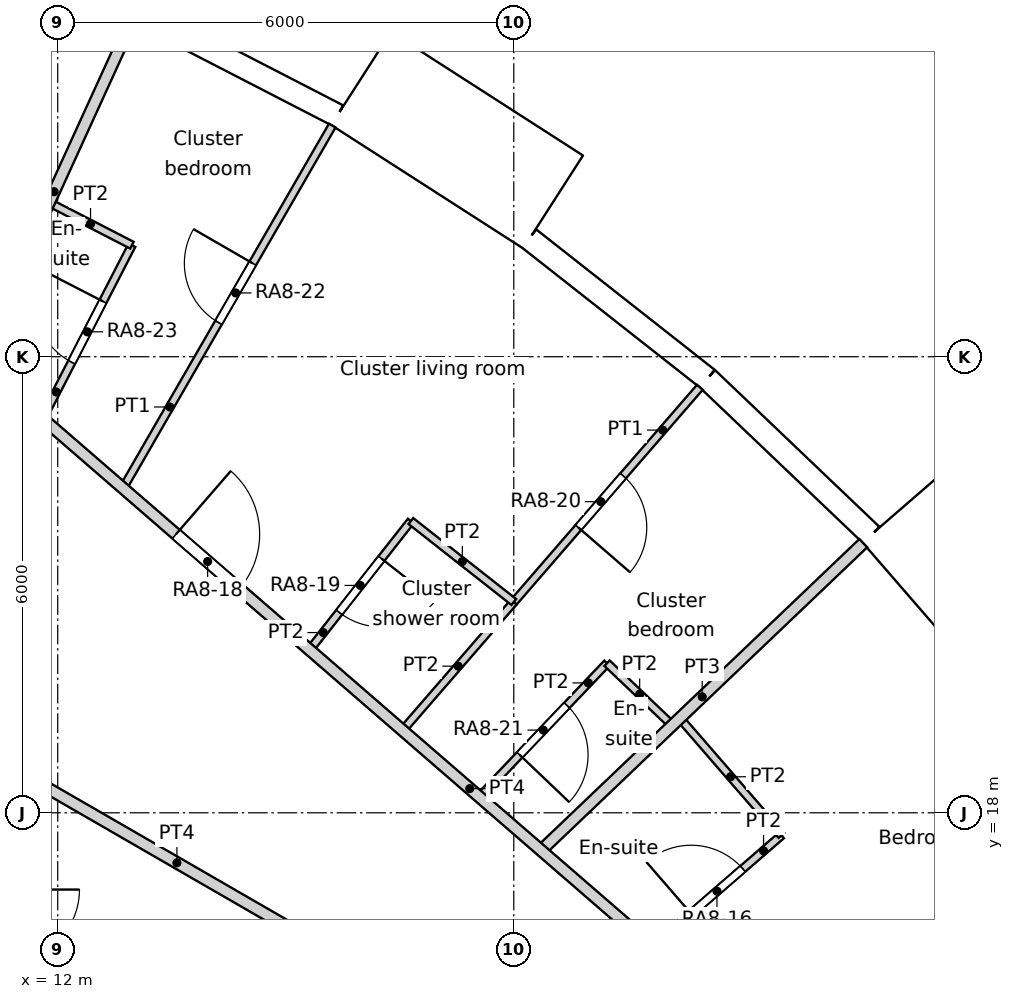
"""IFC4 building model, lengths in metres.
Left out: names, types, materials, properties, quantities, classifications, styles, units other than length and angle.
Written with IfcOpenShell. Run it as: python <this file> out.ifc"""

import sys

from ifc_helpers import new_model, si_unit, direction, frame, frame_2d, origin, origin_2d, place, context, subcontext, project, spatial, rectangle, circle, extrude, element, fill, save


model = new_model("IFC4")
c1 = context("Model", 3, precision=1e-05, world=origin(), true_north=direction((0.0, 1.0)))
c2 = subcontext(c1, "Body", "Model", "MODEL_VIEW")
j1 = project(units=[si_unit("LENGTHUNIT", "METRE"), si_unit("PLANEANGLEUNIT", "RADIAN")], contexts=[c1])
p1 = place(None, origin())
s1 = spatial("IfcSite", under=j1, at=p1, CompositionType="ELEMENT")
p2 = place(p1, origin())
s2 = spatial("IfcBuilding", under=s1, at=p2, CompositionType="ELEMENT")
p3 = place(p2, frame((0.0, 0.0, 103.8)))
s3 = spatial("IfcBuildingStorey", under=s2, at=p3, CompositionType="ELEMENT", Elevation=103.8)
for number, where, z_axis, x_axis in (
    (1, (21.911, 20.892, 0.0), (0.0, 0.0, 1.0), (1.0, 0.0, 0.0)),
    (2, (17.561, 24.661, 0.0), (0.0, 0.0, 1.0), (1.0, 0.0, 0.0)),
    (3, (12.576, 27.539, 0.0), (0.0, 0.0, 1.0), (1.0, 0.0, 0.0)),
):
    element("IfcColumn", number, at=place(p3, frame(where, z_axis=z_axis, x_axis=x_axis)), inside=s3, PredefinedType="COLUMN", context=c2, shape_type="SweptSolid", body=[
        extrude(circle(Radius=0.6, at=origin_2d()), origin(), (0.0, 0.0, 1.0), 3.6),
    ])
p4 = place(p3, frame((14.659, 19.69, 0.0), z_axis=(0.0, 0.0, 1.0), x_axis=(1.0, 0.0, 0.0)))
e4 = element("IfcColumn", 4, at=p4, inside=s3, PredefinedType="COLUMN", context=c2, shape_type="SweptSolid", body=[
    extrude(circle(Radius=0.65, at=origin_2d()), origin(), (0.0, 0.0, 1.0), 3.6),
])
p5 = place(p3, frame((25.101, 19.766, -0.45), z_axis=(0.0, 0.0, 1.0), x_axis=(-0.654890259022, 0.75572398972, 0.0)))
e5 = element("IfcWall", 5, at=p5, inside=s3, PredefinedType="ELEMENTEDWALL", context=c2, shape_type="SweptSolid", body=[
    extrude(rectangle(XDim=3.0, YDim=1.45, at=frame_2d((1.5, 0.0))), origin(), (0.0, 0.0, 1.0), 3.6),
])
p6 = place(p5, frame((1.5, 0.0, 2.0)))
e6 = element("IfcOpeningElement", 6, at=p6, cuts=e5, PredefinedType="OPENING", context=c2, shape_type="SweptSolid", body=[
    extrude(circle(Radius=0.9, at=origin_2d()), frame((0.0, 0.735, 0.0), z_axis=(0.0, -1.0, 0.0), x_axis=(1.0, 0.0, 0.0)), (0.0, 0.0, 1.0), 1.47),
])
p7 = place(p3, frame((22.702, 21.655, 0.0), z_axis=(0.0, 0.0, 1.0), x_axis=(-0.723744206617, 0.690068346896, 0.0)))
e7 = element("IfcWall", 7, at=p7, inside=s3, PredefinedType="SOLIDWALL", context=c2, shape_type="SweptSolid", body=[
    extrude(rectangle(XDim=2.98, YDim=0.3, at=frame_2d((1.49, 0.0))), origin(), (0.0, 0.0, 1.0), 3.15),
])
p8 = place(p7, frame((1.49, 0.0, 1.55)))
e8 = element("IfcOpeningElement", 8, at=p8, cuts=e7, PredefinedType="OPENING", context=c2, shape_type="SweptSolid", body=[
    extrude(circle(Radius=0.9, at=origin_2d()), frame((0.0, 0.16, 0.0), z_axis=(0.0, -1.0, 0.0), x_axis=(1.0, 0.0, 0.0)), (0.0, 0.0, 1.0), 0.32),
])
p9 = place(p3, frame((20.546, 23.711, 0.0), z_axis=(0.0, 0.0, 1.0), x_axis=(-0.786045331304, 0.618168858108, 0.0)))
e9 = element("IfcWall", 9, at=p9, inside=s3, PredefinedType="SOLIDWALL", context=c2, shape_type="SweptSolid", body=[
    extrude(rectangle(XDim=2.98, YDim=0.3, at=frame_2d((1.49, 0.0))), origin(), (0.0, 0.0, 1.0), 3.15),
])
p10 = place(p9, frame((1.49, 0.0, 1.55)))
e10 = element("IfcOpeningElement", 10, at=p10, cuts=e9, PredefinedType="OPENING", context=c2, shape_type="SweptSolid", body=[
    extrude(circle(Radius=0.9, at=origin_2d()), frame((0.0, 0.16, 0.0), z_axis=(0.0, -1.0, 0.0), x_axis=(1.0, 0.0, 0.0)), (0.0, 0.0, 1.0), 0.32),
])
p11 = place(p3, frame((18.516, 26.037, -0.45), z_axis=(0.0, 0.0, 1.0), x_axis=(-0.841223422347, 0.540687667415, 0.0)))
e11 = element("IfcWall", 11, at=p11, inside=s3, PredefinedType="ELEMENTEDWALL", context=c2, shape_type="SweptSolid", body=[
    extrude(rectangle(XDim=3.0, YDim=1.45, at=frame_2d((1.5, 0.0))), origin(), (0.0, 0.0, 1.0), 3.6),
])
p12 = place(p11, frame((1.5, 0.0, 2.0)))
e12 = element("IfcOpeningElement", 12, at=p12, cuts=e11, PredefinedType="OPENING", context=c2, shape_type="SweptSolid", body=[
    extrude(circle(Radius=0.9, at=origin_2d()), frame((0.0, 0.735, 0.0), z_axis=(0.0, -1.0, 0.0), x_axis=(1.0, 0.0, 0.0)), (0.0, 0.0, 1.0), 1.47),
])
p13 = place(p3, frame((15.682, 27.174, 0.0), z_axis=(0.0, 0.0, 1.0), x_axis=(-0.888819853856, 0.458256770153, 0.0)))
e13 = element("IfcWall", 13, at=p13, inside=s3, PredefinedType="SOLIDWALL", context=c2, shape_type="SweptSolid", body=[
    extrude(rectangle(XDim=2.98, YDim=0.3, at=frame_2d((1.49, 0.0))), origin(), (0.0, 0.0, 1.0), 3.15),
])
p14 = place(p13, frame((1.49, 0.0, 1.55)))
e14 = element("IfcOpeningElement", 14, at=p14, cuts=e13, PredefinedType="OPENING", context=c2, shape_type="SweptSolid", body=[
    extrude(circle(Radius=0.9, at=origin_2d()), frame((0.0, 0.16, 0.0), z_axis=(0.0, -1.0, 0.0), x_axis=(1.0, 0.0, 0.0)), (0.0, 0.0, 1.0), 0.32),
])
p15 = place(p3, frame((10.932, 23.939, 0.0), z_axis=(0.0, 0.0, 1.0), x_axis=(0.755838982892, -0.654757536757, 0.0)))
e15 = element("IfcWall", 15, at=p15, inside=s3, PredefinedType="PARTITIONING", context=c2, shape_type="SweptSolid", body=[
    extrude(rectangle(XDim=14.83, YDim=0.15, at=frame_2d((7.415, 0.0))), origin(), (0.0, 0.0, 1.0), 3.15),
])
p16 = place(p15, frame((12.796, 0.0, 0.0)))
e16 = element("IfcOpeningElement", 16, at=p16, cuts=e15, PredefinedType="OPENING", context=c2, shape_type="SweptSolid", body=[
    extrude(rectangle(XDim=1.0, YDim=2.1, at=frame_2d((0.5, 1.05))), frame((0.0, 0.075, 0.0), z_axis=(0.0, -1.0, 0.0), x_axis=(1.0, 0.0, 0.0)), (0.0, 0.0, 1.0), 0.15),
])
p17 = place(p15, frame((3.472, 0.0, 0.0)))
e17 = element("IfcOpeningElement", 17, at=p17, cuts=e15, PredefinedType="OPENING", context=c2, shape_type="SweptSolid", body=[
    extrude(rectangle(XDim=1.1, YDim=2.1, at=frame_2d((0.55, 1.05))), frame((0.0, 0.075, 0.0), z_axis=(0.0, -1.0, 0.0), x_axis=(1.0, 0.0, 0.0)), (0.0, 0.0, 1.0), 0.15),
])
p18 = place(p3, frame((11.336, 18.63, 0.0), z_axis=(0.0, 0.0, 1.0), x_axis=(0.866063337164, -0.499934291702, 0.0)))
e18 = element("IfcWall", 18, at=p18, inside=s3, PredefinedType="PARTITIONING", context=c2, shape_type="SweptSolid", body=[
    extrude(rectangle(XDim=5.155, YDim=0.15, at=frame_2d((2.577, 0.0))), origin(), (0.0, 0.0, 1.0), 3.15),
])
p19 = place(p3, frame((22.141, 14.229, 0.0), z_axis=(0.0, 0.0, 1.0), x_axis=(0.841265781699, 0.540621757371, 0.0)))
e19 = element("IfcWall", 19, at=p19, inside=s3, PredefinedType="PARTITIONING", context=c2, shape_type="SweptSolid", body=[
    extrude(rectangle(XDim=4.906, YDim=0.15, at=frame_2d((2.453, 0.0))), origin(), (0.0, 0.0, 1.0), 3.15),
])
p20 = place(p3, frame((19.826, 16.234, 0.0), z_axis=(0.0, 0.0, 1.0), x_axis=(0.755703447798, 0.654913963042, 0.0)))
e20 = element("IfcWall", 20, at=p20, inside=s3, PredefinedType="PARTITIONING", context=c2, shape_type="SweptSolid", body=[
    extrude(rectangle(XDim=2.243, YDim=0.1, at=frame_2d((1.122, 0.0))), origin(), (0.0, 0.0, 1.0), 3.15),
])
p21 = place(p20, frame((0.671, 0.0, 0.0)))
e21 = element("IfcOpeningElement", 21, at=p21, cuts=e20, PredefinedType="OPENING", context=c2, shape_type="SweptSolid", body=[
    extrude(rectangle(XDim=0.9, YDim=2.04, at=frame_2d((0.45, 1.02))), frame((0.0, 0.05, 0.0), z_axis=(0.0, -1.0, 0.0), x_axis=(1.0, 0.0, 0.0)), (0.0, 0.0, 1.0), 0.1),
])
p22 = place(p3, frame((20.184, 19.245, 0.0), z_axis=(0.0, 0.0, 1.0), x_axis=(0.655017058368, -0.755614090159, 0.0)))
e22 = element("IfcWall", 22, at=p22, inside=s3, PredefinedType="PARTITIONING", context=c2, shape_type="SweptSolid", body=[
    extrude(rectangle(XDim=2.041, YDim=0.1, at=frame_2d((1.021, 0.0))), origin(), (0.0, 0.0, 1.0), 3.15),
])
p23 = place(p3, frame((18.36, 17.505, 0.0), z_axis=(0.0, 0.0, 1.0), x_axis=(0.723686703731, 0.690128650937, 0.0)))
e23 = element("IfcWall", 23, at=p23, inside=s3, PredefinedType="PARTITIONING", context=c2, shape_type="SweptSolid", body=[
    extrude(rectangle(XDim=5.856, YDim=0.15, at=frame_2d((2.928, 0.0))), origin(), (0.0, 0.0, 1.0), 3.15),
])
p24 = place(p3, frame((16.646, 21.838, 0.0), z_axis=(0.0, 0.0, 1.0), x_axis=(0.78601333061, -0.618209547082, 0.0)))
e24 = element("IfcWall", 24, at=p24, inside=s3, PredefinedType="PARTITIONING", context=c2, shape_type="SweptSolid", body=[
    extrude(rectangle(XDim=1.723, YDim=0.1, at=frame_2d((0.861, 0.0))), origin(), (0.0, 0.0, 1.0), 3.15),
])
p25 = place(p3, frame((15.315, 20.144, 0.0), z_axis=(0.0, 0.0, 1.0), x_axis=(0.617871601496, 0.786279011588, 0.0)))
e25 = element("IfcWall", 25, at=p25, inside=s3, PredefinedType="PARTITIONING", context=c2, shape_type="SweptSolid", body=[
    extrude(rectangle(XDim=2.154, YDim=0.1, at=frame_2d((1.077, 0.0))), origin(), (0.0, 0.0, 1.0), 3.15),
])
p26 = place(p25, frame((0.627, 0.0, 0.0)))
e26 = element("IfcOpeningElement", 26, at=p26, cuts=e25, PredefinedType="OPENING", context=c2, shape_type="SweptSolid", body=[
    extrude(rectangle(XDim=0.9, YDim=2.0, at=frame_2d((0.45, 1.0))), frame((0.0, 0.05, 0.0), z_axis=(0.0, -1.0, 0.0), x_axis=(1.0, 0.0, 0.0)), (0.0, 0.0, 1.0), 0.1),
])
p27 = place(p3, frame((18.0, 20.773, 0.0), z_axis=(0.0, 0.0, 1.0), x_axis=(0.654885780154, 0.755727870964, 0.0)))
e27 = element("IfcWall", 27, at=p27, inside=s3, PredefinedType="PARTITIONING", context=c2, shape_type="SweptSolid", body=[
    extrude(rectangle(XDim=3.738, YDim=0.1, at=frame_2d((1.869, 0.0))), origin(), (0.0, 0.0, 1.0), 3.15),
])
p28 = place(p27, frame((1.297, 0.0, 0.0)))
e28 = element("IfcOpeningElement", 28, at=p28, cuts=e27, PredefinedType="OPENING", context=c2, shape_type="SweptSolid", body=[
    extrude(rectangle(XDim=0.9, YDim=2.1, at=frame_2d((0.45, 1.05))), frame((0.0, 0.05, 0.0), z_axis=(0.0, -1.0, 0.0), x_axis=(1.0, 0.0, 0.0)), (0.0, 0.0, 1.0), 0.1),
])
p29 = place(p3, frame((12.859, 22.272, 0.0), z_axis=(0.0, 0.0, 1.0), x_axis=(0.499968073049, 0.866043836033, 0.0)))
e29 = element("IfcWall", 29, at=p29, inside=s3, PredefinedType="PARTITIONING", context=c2, shape_type="SweptSolid", body=[
    extrude(rectangle(XDim=5.507, YDim=0.1, at=frame_2d((2.753, 0.0))), origin(), (0.0, 0.0, 1.0), 3.15),
])
p30 = place(p29, frame((2.514, 0.0, 0.0)))
e30 = element("IfcOpeningElement", 30, at=p30, cuts=e29, PredefinedType="OPENING", context=c2, shape_type="SweptSolid", body=[
    extrude(rectangle(XDim=0.9, YDim=2.1, at=frame_2d((0.45, 1.05))), frame((0.0, 0.05, 0.0), z_axis=(0.0, -1.0, 0.0), x_axis=(1.0, 0.0, 0.0)), (0.0, 0.0, 1.0), 0.1),
])
p31 = place(p3, frame((16.537, 19.085, 0.0), z_axis=(0.0, 0.0, 1.0), x_axis=(0.654922216086, 0.755696295397, 0.0)))
e31 = element("IfcWall", 31, at=p31, inside=s3, PredefinedType="PARTITIONING", context=c2, shape_type="SweptSolid", body=[
    extrude(rectangle(XDim=2.234, YDim=0.1, at=frame_2d((1.117, 0.0))), origin(), (0.0, 0.0, 1.0), 3.15),
])
p32 = place(p3, frame((19.227, 19.968, 0.0), z_axis=(0.0, 0.0, 1.0), x_axis=(0.724103627225, -0.68969118962, 0.0)))
e32 = element("IfcWall", 32, at=p32, inside=s3, PredefinedType="PARTITIONING", context=c2, shape_type="SweptSolid", body=[
    extrude(rectangle(XDim=1.185, YDim=0.1, at=frame_2d((0.592, 0.0))), origin(), (0.0, 0.0, 1.0), 3.15),
])
p33 = place(p3, frame((17.549, 18.208, 0.0), z_axis=(0.0, 0.0, 1.0), x_axis=(0.690038643162, 0.723772527071, 0.0)))
e33 = element("IfcWall", 33, at=p33, inside=s3, PredefinedType="PARTITIONING", context=c2, shape_type="SweptSolid", body=[
    extrude(rectangle(XDim=2.432, YDim=0.1, at=frame_2d((1.216, 0.0))), origin(), (0.0, 0.0, 1.0), 3.15),
])
p34 = place(p33, frame((0.766, 0.0, 0.0)))
e34 = element("IfcOpeningElement", 34, at=p34, cuts=e33, PredefinedType="OPENING", context=c2, shape_type="SweptSolid", body=[
    extrude(rectangle(XDim=0.9, YDim=2.04, at=frame_2d((0.45, 1.02))), frame((0.0, 0.05, 0.0), z_axis=(0.0, -1.0, 0.0), x_axis=(1.0, 0.0, 0.0)), (0.0, 0.0, 1.0), 0.1),
])
p35 = place(p3, frame((11.802, 23.188, 0.0), z_axis=(0.0, 0.0, 1.0), x_axis=(0.457961150758, 0.888972206763, 0.0)))
e35 = element("IfcWall", 35, at=p35, inside=s3, PredefinedType="PARTITIONING", context=c2, shape_type="SweptSolid", body=[
    extrude(rectangle(XDim=2.564, YDim=0.1, at=frame_2d((1.282, 0.0))), origin(), (0.0, 0.0, 1.0), 3.15),
])
p36 = place(p35, frame((0.832, 0.0, 0.0)))
e36 = element("IfcOpeningElement", 36, at=p36, cuts=e35, PredefinedType="OPENING", context=c2, shape_type="SweptSolid", body=[
    extrude(rectangle(XDim=0.9, YDim=2.04, at=frame_2d((0.45, 1.02))), frame((0.0, 0.05, 0.0), z_axis=(0.0, -1.0, 0.0), x_axis=(1.0, 0.0, 0.0)), (0.0, 0.0, 1.0), 0.1),
])
p37 = place(p3, frame((11.887, 26.028, 0.0), z_axis=(0.0, 0.0, 1.0), x_axis=(0.888981931645, -0.457942272791, 0.0)))
e37 = element("IfcWall", 37, at=p37, inside=s3, PredefinedType="PARTITIONING", context=c2, shape_type="SweptSolid", body=[
    extrude(rectangle(XDim=1.225, YDim=0.1, at=frame_2d((0.613, 0.0))), origin(), (0.0, 0.0, 1.0), 3.15),
])
p38 = place(p3, frame((10.934, 23.94, 0.0), z_axis=(0.0, 0.0, 1.0), x_axis=(0.415204619086, 0.909728049633, 0.0)))
e38 = element("IfcWall", 38, at=p38, inside=s3, PredefinedType="PARTITIONING", context=c2, shape_type="SweptSolid", body=[
    extrude(rectangle(XDim=4.906, YDim=0.15, at=frame_2d((2.453, 0.0))), origin(), (0.0, 0.0, 1.0), 3.15),
])
p39 = place(p6, origin())
e39 = element("IfcWindow", 39, at=p39, inside=s3, PartitioningType="SINGLE_PANEL", PredefinedType="WINDOW", context=c2, shape_type="SweptSolid", body=[
    extrude(circle(Radius=0.9, at=origin_2d()), frame((0.0, 0.695, 0.0), z_axis=(0.0, -1.0, 0.0), x_axis=(1.0, 0.0, 0.0)), (0.0, 0.0, 1.0), 0.1),
])
fill(e6, e39)
p40 = place(p8, origin())
e40 = element("IfcWindow", 40, at=p40, inside=s3, PartitioningType="SINGLE_PANEL", PredefinedType="WINDOW", context=c2, shape_type="SweptSolid", body=[
    extrude(circle(Radius=0.9, at=origin_2d()), frame((0.0, 0.12, 0.0), z_axis=(0.0, -1.0, 0.0), x_axis=(1.0, 0.0, 0.0)), (0.0, 0.0, 1.0), 0.1),
])
fill(e8, e40)
p41 = place(p10, origin())
e41 = element("IfcWindow", 41, at=p41, inside=s3, PartitioningType="SINGLE_PANEL", PredefinedType="WINDOW", context=c2, shape_type="SweptSolid", body=[
    extrude(circle(Radius=0.9, at=origin_2d()), frame((0.0, 0.12, 0.0), z_axis=(0.0, -1.0, 0.0), x_axis=(1.0, 0.0, 0.0)), (0.0, 0.0, 1.0), 0.1),
])
fill(e10, e41)
p42 = place(p12, origin())
e42 = element("IfcWindow", 42, at=p42, inside=s3, PartitioningType="SINGLE_PANEL", PredefinedType="WINDOW", context=c2, shape_type="SweptSolid", body=[
    extrude(circle(Radius=0.9, at=origin_2d()), frame((0.0, 0.695, 0.0), z_axis=(0.0, -1.0, 0.0), x_axis=(1.0, 0.0, 0.0)), (0.0, 0.0, 1.0), 0.1),
])
fill(e12, e42)
p43 = place(p14, origin())
e43 = element("IfcWindow", 43, at=p43, inside=s3, PartitioningType="SINGLE_PANEL", PredefinedType="WINDOW", context=c2, shape_type="SweptSolid", body=[
    extrude(circle(Radius=0.9, at=origin_2d()), frame((0.0, 0.12, 0.0), z_axis=(0.0, -1.0, 0.0), x_axis=(1.0, 0.0, 0.0)), (0.0, 0.0, 1.0), 0.1),
])
fill(e14, e43)
p44 = place(p21, origin())
e44 = element("IfcDoor", 44, at=p44, inside=s3, OperationType="SINGLE_SWING_LEFT", PredefinedType="DOOR", context=c2, shape_type="SweptSolid", body=[
    extrude(rectangle(XDim=0.9, YDim=2.04, at=frame_2d((0.45, 1.02))), frame((0.0, 0.025, 0.0), z_axis=(0.0, -1.0, 0.0), x_axis=(1.0, 0.0, 0.0)), (0.0, 0.0, 1.0), 0.05),
])
fill(e21, e44)
p45 = place(p17, origin())
e45 = element("IfcDoor", 45, at=p45, inside=s3, OperationType="SINGLE_SWING_LEFT", PredefinedType="DOOR", context=c2, shape_type="SweptSolid", body=[
    extrude(rectangle(XDim=1.1, YDim=2.1, at=frame_2d((0.55, 1.05))), frame((0.0, 0.025, 0.0), z_axis=(0.0, -1.0, 0.0), x_axis=(1.0, 0.0, 0.0)), (0.0, 0.0, 1.0), 0.05),
])
fill(e17, e45)
p46 = place(p26, origin())
e46 = element("IfcDoor", 46, at=p46, inside=s3, OperationType="SINGLE_SWING_LEFT", PredefinedType="DOOR", context=c2, shape_type="SweptSolid", body=[
    extrude(rectangle(XDim=0.9, YDim=2.0, at=frame_2d((0.45, 1.0))), frame((0.0, 0.025, 0.0), z_axis=(0.0, -1.0, 0.0), x_axis=(1.0, 0.0, 0.0)), (0.0, 0.0, 1.0), 0.05),
])
fill(e26, e46)
p47 = place(p28, origin())
e47 = element("IfcDoor", 47, at=p47, inside=s3, OperationType="SINGLE_SWING_RIGHT", PredefinedType="DOOR", context=c2, shape_type="SweptSolid", body=[
    extrude(rectangle(XDim=0.9, YDim=2.1, at=frame_2d((0.45, 1.05))), frame((0.0, 0.025, 0.0), z_axis=(0.0, -1.0, 0.0), x_axis=(1.0, 0.0, 0.0)), (0.0, 0.0, 1.0), 0.05),
])
fill(e28, e47)
p48 = place(p34, origin())
e48 = element("IfcDoor", 48, at=p48, inside=s3, OperationType="SINGLE_SWING_RIGHT", PredefinedType="DOOR", context=c2, shape_type="SweptSolid", body=[
    extrude(rectangle(XDim=0.9, YDim=2.04, at=frame_2d((0.45, 1.02))), frame((0.0, 0.025, 0.0), z_axis=(0.0, -1.0, 0.0), x_axis=(1.0, 0.0, 0.0)), (0.0, 0.0, 1.0), 0.05),
])
fill(e34, e48)
p49 = place(p30, origin())
e49 = element("IfcDoor", 49, at=p49, inside=s3, OperationType="SINGLE_SWING_RIGHT", PredefinedType="DOOR", context=c2, shape_type="SweptSolid", body=[
    extrude(rectangle(XDim=0.9, YDim=2.1, at=frame_2d((0.45, 1.05))), frame((0.0, 0.025, 0.0), z_axis=(0.0, -1.0, 0.0), x_axis=(1.0, 0.0, 0.0)), (0.0, 0.0, 1.0), 0.05),
])
fill(e30, e49)
p50 = place(p36, origin())
e50 = element("IfcDoor", 50, at=p50, inside=s3, OperationType="SINGLE_SWING_RIGHT", PredefinedType="DOOR", context=c2, shape_type="SweptSolid", body=[
    extrude(rectangle(XDim=0.9, YDim=2.04, at=frame_2d((0.45, 1.02))), frame((0.0, 0.025, 0.0), z_axis=(0.0, -1.0, 0.0), x_axis=(1.0, 0.0, 0.0)), (0.0, 0.0, 1.0), 0.05),
])
fill(e36, e50)
save(model, sys.argv[1])
